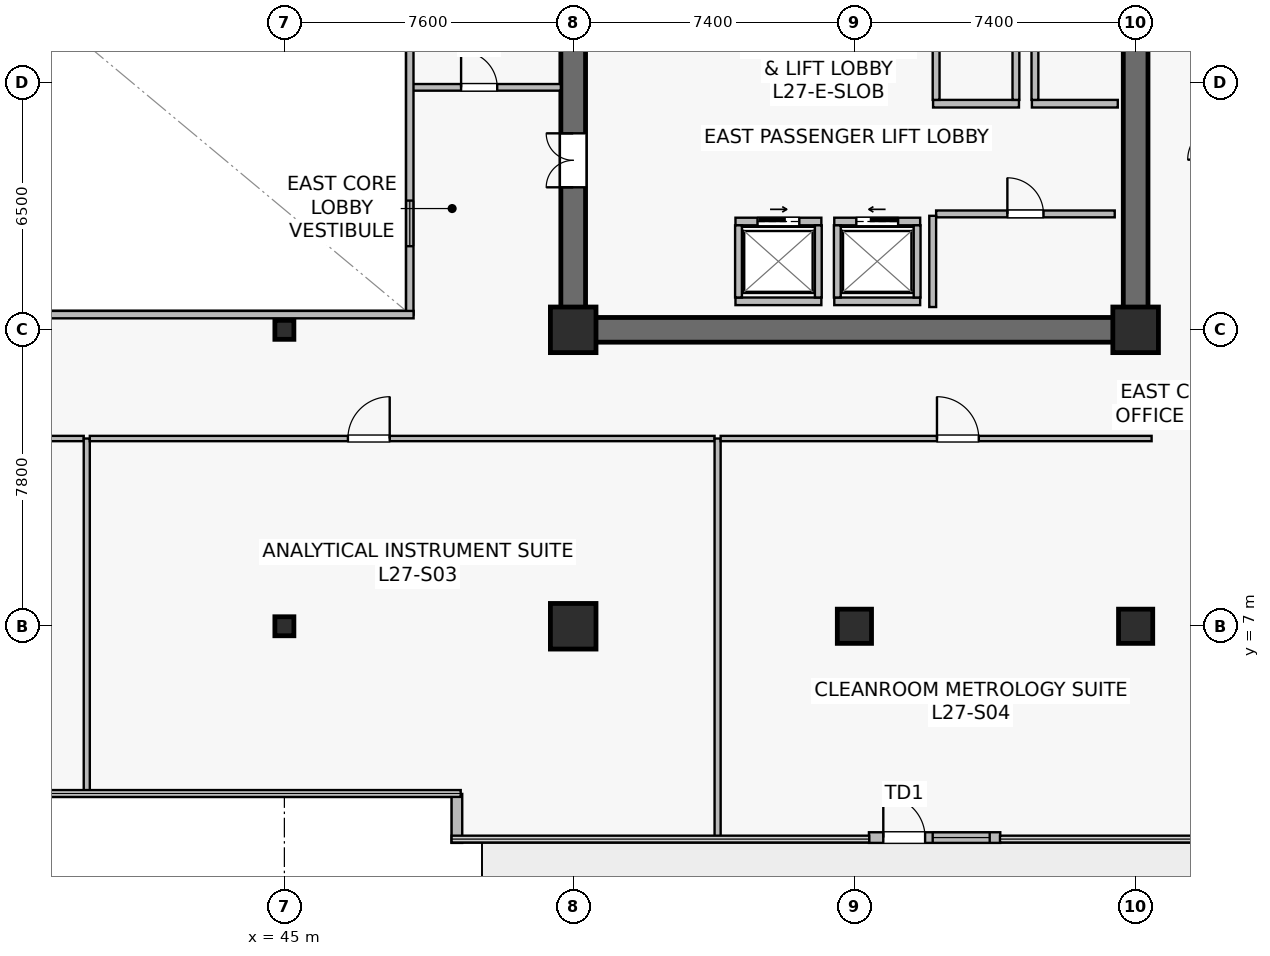
"""IFC4 building model, lengths in metres.
Left out: names, types, materials, properties, quantities, classifications, styles, units other than length and angle.
Written with IfcOpenShell. Run it as: python <this file> out.ifc"""

import sys

from ifc_helpers import new_model, si_unit, direction, frame, frame_2d, origin, origin_2d, place, context, subcontext, project, spatial, rectangle, hollow_rectangle, extrude, source, transform, mapped, element, fill, save


model = new_model("IFC4")
c1 = context("Model", 3, precision=1e-05, world=origin(), true_north=direction((0.0, 1.0)))
c2 = subcontext(c1, "Body", "Model", "MODEL_VIEW")
j1 = project(units=[si_unit("LENGTHUNIT", "METRE"), si_unit("PLANEANGLEUNIT", "RADIAN")], contexts=[c1])
p1 = place(None, origin())
s1 = spatial("IfcSite", under=j1, at=p1, CompositionType="ELEMENT")
p2 = place(p1, origin())
s2 = spatial("IfcBuilding", under=s1, at=p2, CompositionType="ELEMENT")
p3 = place(p2, frame((0.0, 0.0, 113.3)))
s3 = spatial("IfcBuildingStorey", under=s2, at=p3, CompositionType="ELEMENT", Elevation=113.3)
p4 = place(p3, frame((52.275, 14.8, 0.0), z_axis=(0.0, 0.0, 1.0), x_axis=(1.0, 0.0, 0.0)))
e1 = element("IfcWall", 1, at=p4, inside=s3, PredefinedType="SHEAR", context=c2, shape_type="SweptSolid", body=[
    extrude(rectangle(XDim=15.45, YDim=0.65, at=frame_2d((7.725, 0.0))), origin(), (0.0, 0.0, 1.0), 3.79),
])
p5 = place(p3, frame((52.6, 15.125, 0.0), z_axis=(0.0, 0.0, 1.0), x_axis=(0.0, 1.0, 0.0)))
e2 = element("IfcWall", 2, at=p5, inside=s3, PredefinedType="SHEAR", context=c2, shape_type="SweptSolid", body=[
    extrude(rectangle(XDim=18.35, YDim=0.65, at=frame_2d((9.175, 0.0))), origin(), (0.0, 0.0, 1.0), 3.79),
])
p6 = place(p5, frame((3.425, 0.0, 0.0)))
e3 = element("IfcOpeningElement", 3, at=p6, cuts=e2, PredefinedType="OPENING", context=c2, shape_type="SweptSolid", body=[
    extrude(rectangle(XDim=1.42, YDim=2.2, at=frame_2d((0.71, 1.1))), frame((0.0, 0.335, 0.0), z_axis=(0.0, -1.0, 0.0), x_axis=(1.0, 0.0, 0.0)), (0.0, 0.0, 1.0), 0.67),
])
p7 = place(p3, frame((67.4, 15.125, 0.0), z_axis=(0.0, 0.0, 1.0), x_axis=(0.0, 1.0, 0.0)))
e4 = element("IfcWall", 4, at=p7, inside=s3, PredefinedType="SHEAR", context=c2, shape_type="SweptSolid", body=[
    extrude(rectangle(XDim=18.35, YDim=0.65, at=frame_2d((9.175, 0.0))), origin(), (0.0, 0.0, 1.0), 3.79),
])
m1 = source(origin(), c2, "Body", "SweptSolid", [
    extrude(rectangle(XDim=1.2, YDim=1.2, at=origin_2d()), origin(), (0.0, 0.0, 1.0), 4.1),
])
p8 = place(p3, frame((52.6, 7.0, 0.0), z_axis=(0.0, 0.0, 1.0), x_axis=(1.0, 0.0, 0.0)))
e5 = element("IfcColumn", 5, at=p8, inside=s3, PredefinedType="COLUMN", context=c2, shape_type="MappedRepresentation", body=[
    mapped(m1, transform((0.0, 0.0, 0.0), scale=1.0)),
])
m2 = source(origin(), c2, "Body", "SweptSolid", [
    extrude(rectangle(XDim=0.9, YDim=0.9, at=origin_2d()), origin(), (0.0, 0.0, 1.0), 4.1),
])
p9 = place(p3, frame((60.0, 7.0, 0.0), z_axis=(0.0, 0.0, 1.0), x_axis=(1.0, 0.0, 0.0)))
e6 = element("IfcColumn", 6, at=p9, inside=s3, PredefinedType="COLUMN", context=c2, shape_type="MappedRepresentation", body=[
    mapped(m2, transform((0.0, 0.0, 0.0), scale=1.0)),
])
for number, where, z_axis, x_axis in (
    (7, (52.6, 14.8, 0.0), (0.0, 0.0, 1.0), (1.0, 0.0, 0.0)),
    (8, (67.4, 14.8, 0.0), (0.0, 0.0, 1.0), (1.0, 0.0, 0.0)),
):
    element("IfcColumn", number, at=place(p3, frame(where, z_axis=z_axis, x_axis=x_axis)), inside=s3, PredefinedType="COLUMN", context=c2, shape_type="MappedRepresentation", body=[
        mapped(m1, transform((0.0, 0.0, 0.0), scale=1.0)),
    ])
p10 = place(p3, frame((67.4, 7.0, 0.0), z_axis=(0.0, 0.0, 1.0), x_axis=(1.0, 0.0, 0.0)))
e9 = element("IfcColumn", 9, at=p10, inside=s3, PredefinedType="COLUMN", context=c2, shape_type="MappedRepresentation", body=[
    mapped(m2, transform((0.0, 0.0, 0.0), scale=1.0)),
])
m3 = source(origin(), c2, "Body", "SweptSolid", [
    extrude(hollow_rectangle(XDim=0.5, YDim=0.5, WallThickness=0.022, at=origin_2d()), origin(), (0.0, 0.0, 1.0), 4.1),
])
for number, where, z_axis, x_axis in (
    (10, (45.0, 7.0, 0.0), (0.0, 0.0, 1.0), (1.0, 0.0, 0.0)),
    (11, (45.0, 14.8, 0.0), (0.0, 0.0, 1.0), (1.0, 0.0, 0.0)),
):
    element("IfcColumn", number, at=place(p3, frame(where, z_axis=z_axis, x_axis=x_axis)), inside=s3, PredefinedType="COLUMN", context=c2, shape_type="MappedRepresentation", body=[
        mapped(m3, transform((0.0, 0.0, 0.0), scale=1.0)),
    ])
p11 = place(p3, frame((60.382, 1.44, 0.0), z_axis=(0.0, 0.0, 1.0), x_axis=(1.0, 0.0, 0.0)))
e12 = element("IfcWall", 12, at=p11, inside=s3, PredefinedType="STANDARD", context=c2, shape_type="SweptSolid", body=[
    extrude(rectangle(XDim=3.456, YDim=0.28, at=frame_2d((1.728, 0.0))), origin(), (0.0, 0.0, 1.0), 3.79),
])
p12 = place(p11, frame((0.378, 0.0, 0.0)))
e13 = element("IfcOpeningElement", 13, at=p12, cuts=e12, PredefinedType="OPENING", context=c2, shape_type="SweptSolid", body=[
    extrude(rectangle(XDim=1.1, YDim=2.2, at=frame_2d((0.55, 1.1))), frame((0.0, 0.15, 0.0), z_axis=(0.0, -1.0, 0.0), x_axis=(1.0, 0.0, 0.0)), (0.0, 0.0, 1.0), 0.3),
])
p13 = place(p11, frame((1.678, 0.0, 0.9)))
e14 = element("IfcOpeningElement", 14, at=p13, cuts=e12, PredefinedType="OPENING", context=c2, shape_type="SweptSolid", body=[
    extrude(rectangle(XDim=1.5, YDim=2.2, at=frame_2d((0.75, 1.1))), frame((0.0, 0.15, 0.0), z_axis=(0.0, -1.0, 0.0), x_axis=(1.0, 0.0, 0.0)), (0.0, 0.0, 1.0), 0.3),
])
p14 = place(p3, frame((49.54, 2.588, 0.0), z_axis=(0.0, 0.0, 1.0), x_axis=(0.0, -1.0, 0.0)))
e15 = element("IfcWall", 15, at=p14, inside=s3, PredefinedType="STANDARD", context=c2, shape_type="SweptSolid", body=[
    extrude(rectangle(XDim=1.288, YDim=0.28, at=frame_2d((0.644, 0.0))), origin(), (0.0, 0.0, 1.0), 3.79),
])
p15 = place(p3, frame((59.47, 17.65, 0.0), z_axis=(0.0, 0.0, 1.0), x_axis=(1.0, 0.0, 0.0)))
e16 = element("IfcWall", 16, at=p15, inside=s3, PredefinedType="SOLIDWALL", context=c2, shape_type="SweptSolid", body=[
    extrude(rectangle(XDim=2.26, YDim=0.2, at=frame_2d((1.13, 0.0))), origin(), (0.0, 0.0, 1.0), 3.125),
])
p16 = place(p15, frame((0.58, 0.0, 0.0)))
e17 = element("IfcOpeningElement", 17, at=p16, cuts=e16, PredefinedType="OPENING", context=c2, shape_type="SweptSolid", body=[
    extrude(rectangle(XDim=1.1, YDim=2.22, at=frame_2d((0.55, 1.11))), frame((0.0, 0.11, 0.0), z_axis=(0.0, -1.0, 0.0), x_axis=(1.0, 0.0, 0.0)), (0.0, 0.0, 1.0), 0.22),
])
p17 = place(p3, frame((59.47, 15.55, 0.0), z_axis=(0.0, 0.0, 1.0), x_axis=(1.0, 0.0, 0.0)))
e18 = element("IfcWall", 18, at=p17, inside=s3, PredefinedType="SOLIDWALL", context=c2, shape_type="SweptSolid", body=[
    extrude(rectangle(XDim=2.26, YDim=0.2, at=frame_2d((1.13, 0.0))), origin(), (0.0, 0.0, 1.0), 3.125),
])
for number, where, z_axis, x_axis in (
    (19, (59.55, 15.65, 0.0), (0.0, 0.0, 1.0), (0.0, 1.0, 0.0)),
    (20, (61.65, 15.65, 0.0), (0.0, 0.0, 1.0), (0.0, 1.0, 0.0)),
):
    element("IfcWall", number, at=place(p3, frame(where, z_axis=z_axis, x_axis=x_axis)), inside=s3, PredefinedType="SOLIDWALL", context=c2, shape_type="SweptSolid", body=[
        extrude(rectangle(XDim=1.9, YDim=0.18, at=frame_2d((0.95, 0.0))), origin(), (0.0, 0.0, 1.0), 3.79),
    ])
p18 = place(p3, frame((56.87, 17.65, 0.0), z_axis=(0.0, 0.0, 1.0), x_axis=(1.0, 0.0, 0.0)))
e21 = element("IfcWall", 21, at=p18, inside=s3, PredefinedType="SOLIDWALL", context=c2, shape_type="SweptSolid", body=[
    extrude(rectangle(XDim=2.26, YDim=0.2, at=frame_2d((1.13, 0.0))), origin(), (0.0, 0.0, 1.0), 3.79),
])
p19 = place(p18, frame((0.58, 0.0, 0.0)))
e22 = element("IfcOpeningElement", 22, at=p19, cuts=e21, PredefinedType="OPENING", context=c2, shape_type="SweptSolid", body=[
    extrude(rectangle(XDim=1.1, YDim=2.22, at=frame_2d((0.55, 1.11))), frame((0.0, 0.11, 0.0), z_axis=(0.0, -1.0, 0.0), x_axis=(1.0, 0.0, 0.0)), (0.0, 0.0, 1.0), 0.22),
])
p20 = place(p3, frame((56.87, 15.55, 0.0), z_axis=(0.0, 0.0, 1.0), x_axis=(1.0, 0.0, 0.0)))
e23 = element("IfcWall", 23, at=p20, inside=s3, PredefinedType="SOLIDWALL", context=c2, shape_type="SweptSolid", body=[
    extrude(rectangle(XDim=2.26, YDim=0.2, at=frame_2d((1.13, 0.0))), origin(), (0.0, 0.0, 1.0), 3.79),
])
for number, where, z_axis, x_axis in (
    (24, (56.95, 15.65, 0.0), (0.0, 0.0, 1.0), (0.0, 1.0, 0.0)),
    (25, (59.05, 15.65, 0.0), (0.0, 0.0, 1.0), (0.0, 1.0, 0.0)),
):
    element("IfcWall", number, at=place(p3, frame(where, z_axis=z_axis, x_axis=x_axis)), inside=s3, PredefinedType="SOLIDWALL", context=c2, shape_type="SweptSolid", body=[
        extrude(rectangle(XDim=1.9, YDim=0.18, at=frame_2d((0.95, 0.0))), origin(), (0.0, 0.0, 1.0), 3.79),
    ])
p21 = place(p3, frame((64.67, 20.75, 0.0), z_axis=(0.0, 0.0, 1.0), x_axis=(1.0, 0.0, 0.0)))
e26 = element("IfcWall", 26, at=p21, inside=s3, PredefinedType="SOLIDWALL", context=c2, shape_type="SweptSolid", body=[
    extrude(rectangle(XDim=2.26, YDim=0.2, at=frame_2d((1.13, 0.0))), origin(), (0.0, 0.0, 1.0), 3.79),
])
p22 = place(p3, frame((64.75, 20.85, 0.0), z_axis=(0.0, 0.0, 1.0), x_axis=(0.0, 1.0, 0.0)))
e27 = element("IfcWall", 27, at=p22, inside=s3, PredefinedType="SOLIDWALL", context=c2, shape_type="SweptSolid", body=[
    extrude(rectangle(XDim=1.9, YDim=0.18, at=frame_2d((0.95, 0.0))), origin(), (0.0, 0.0, 1.0), 3.79),
])
p23 = place(p3, frame((62.07, 20.75, 0.0), z_axis=(0.0, 0.0, 1.0), x_axis=(1.0, 0.0, 0.0)))
e28 = element("IfcWall", 28, at=p23, inside=s3, PredefinedType="SOLIDWALL", context=c2, shape_type="SweptSolid", body=[
    extrude(rectangle(XDim=2.26, YDim=0.2, at=frame_2d((1.13, 0.0))), origin(), (0.0, 0.0, 1.0), 3.79),
])
for number, where, z_axis, x_axis in (
    (29, (62.15, 20.85, 0.0), (0.0, 0.0, 1.0), (0.0, 1.0, 0.0)),
    (30, (64.25, 20.85, 0.0), (0.0, 0.0, 1.0), (0.0, 1.0, 0.0)),
):
    element("IfcWall", number, at=place(p3, frame(where, z_axis=z_axis, x_axis=x_axis)), inside=s3, PredefinedType="SOLIDWALL", context=c2, shape_type="SweptSolid", body=[
        extrude(rectangle(XDim=1.9, YDim=0.18, at=frame_2d((0.95, 0.0))), origin(), (0.0, 0.0, 1.0), 3.79),
    ])
p24 = place(p3, frame((62.15, 17.85, 0.0), z_axis=(0.0, 0.0, 1.0), x_axis=(1.0, 0.0, 0.0)))
e31 = element("IfcWall", 31, at=p24, inside=s3, PredefinedType="SOLIDWALL", context=c2, shape_type="SweptSolid", body=[
    extrude(rectangle(XDim=4.7, YDim=0.18, at=frame_2d((2.35, 0.0))), origin(), (0.0, 0.0, 1.0), 3.79),
])
p25 = place(p24, frame((1.875, 0.0, 0.0)))
e32 = element("IfcOpeningElement", 32, at=p25, cuts=e31, PredefinedType="OPENING", context=c2, shape_type="SweptSolid", body=[
    extrude(rectangle(XDim=0.95, YDim=2.15, at=frame_2d((0.475, 1.075))), frame((0.0, 0.1, 0.0), z_axis=(0.0, -1.0, 0.0), x_axis=(1.0, 0.0, 0.0)), (0.0, 0.0, 1.0), 0.2),
])
p26 = place(p3, frame((62.06, 15.4, 0.0), z_axis=(0.0, 0.0, 1.0), x_axis=(0.0, 1.0, 0.0)))
e33 = element("IfcWall", 33, at=p26, inside=s3, PredefinedType="SOLIDWALL", context=c2, shape_type="SweptSolid", body=[
    extrude(rectangle(XDim=2.4, YDim=0.18, at=frame_2d((1.2, 0.0))), origin(), (0.0, 0.0, 1.0), 3.79),
])
p27 = place(p3, frame((48.3, 21.18, 0.0), z_axis=(0.0, 0.0, 1.0), x_axis=(1.0, 0.0, 0.0)))
e34 = element("IfcWall", 34, at=p27, inside=s3, PredefinedType="PARTITIONING", context=c2, shape_type="SweptSolid", body=[
    extrude(rectangle(XDim=3.975, YDim=0.175, at=frame_2d((1.987, 0.0))), origin(), (0.0, 0.0, 1.0), 3.79),
])
p28 = place(p27, frame((1.35, 0.0, 0.0)))
e35 = element("IfcOpeningElement", 35, at=p28, cuts=e34, PredefinedType="OPENING", context=c2, shape_type="SweptSolid", body=[
    extrude(rectangle(XDim=0.95, YDim=2.15, at=frame_2d((0.475, 1.075))), frame((0.0, 0.098, 0.0), z_axis=(0.0, -1.0, 0.0), x_axis=(1.0, 0.0, 0.0)), (0.0, 0.0, 1.0), 0.195),
])
p29 = place(p3, frame((48.3, 15.2, 0.0), z_axis=(0.0, 0.0, 1.0), x_axis=(0.0, 1.0, 0.0)))
e36 = element("IfcWall", 36, at=p29, inside=s3, PredefinedType="SOLIDWALL", context=c2, shape_type="SweptSolid", body=[
    extrude(rectangle(XDim=18.2, YDim=0.195, at=frame_2d((9.1, 0.0))), origin(), (0.0, 0.0, 1.0), 3.79),
])
p30 = place(p29, frame((1.8, 0.0, 0.9)))
e37 = element("IfcOpeningElement", 37, at=p30, cuts=e36, PredefinedType="OPENING", context=c2, shape_type="SweptSolid", body=[
    extrude(rectangle(XDim=1.2, YDim=1.35, at=frame_2d((0.6, 0.675))), frame((0.0, 0.107, 0.0), z_axis=(0.0, -1.0, 0.0), x_axis=(1.0, 0.0, 0.0)), (0.0, 0.0, 1.0), 0.215),
])
p31 = place(p29, frame((13.2, 0.0, 0.9)))
e38 = element("IfcOpeningElement", 38, at=p31, cuts=e36, PredefinedType="OPENING", context=c2, shape_type="SweptSolid", body=[
    extrude(rectangle(XDim=1.2, YDim=1.35, at=frame_2d((0.6, 0.675))), frame((0.0, 0.107, 0.0), z_axis=(0.0, -1.0, 0.0), x_axis=(1.0, 0.0, 0.0)), (0.0, 0.0, 1.0), 0.215),
])
p32 = place(p3, frame((26.4, 15.2, 0.0), z_axis=(0.0, 0.0, 1.0), x_axis=(1.0, 0.0, 0.0)))
e39 = element("IfcWall", 39, at=p32, inside=s3, PredefinedType="SOLIDWALL", context=c2, shape_type="SweptSolid", body=[
    extrude(rectangle(XDim=22.0, YDim=0.195, at=frame_2d((11.0, 0.0))), origin(), (0.0, 0.0, 1.0), 3.79),
])
p33 = place(p3, frame((20.68, 11.94, 0.0), z_axis=(0.0, 0.0, 1.0), x_axis=(1.0, 0.0, 0.0)))
e40 = element("IfcWall", 40, at=p33, inside=s3, PredefinedType="PARTITIONING", context=c2, shape_type="SweptSolid", body=[
    extrude(rectangle(XDim=19.04, YDim=0.14, at=frame_2d((9.52, 0.0))), origin(), (0.0, 0.0, 1.0), 3.125),
])
p34 = place(p33, frame((10.004, 0.0, 0.0)))
e41 = element("IfcOpeningElement", 41, at=p34, cuts=e40, PredefinedType="OPENING", context=c2, shape_type="SweptSolid", body=[
    extrude(rectangle(XDim=1.1, YDim=2.18, at=frame_2d((0.55, 1.09))), frame((0.0, 0.08, 0.0), z_axis=(0.0, -1.0, 0.0), x_axis=(1.0, 0.0, 0.0)), (0.0, 0.0, 1.0), 0.16),
])
p35 = place(p3, frame((39.8, 2.61, 0.0), z_axis=(0.0, 0.0, 1.0), x_axis=(0.0, 1.0, 0.0)))
e42 = element("IfcWall", 42, at=p35, inside=s3, PredefinedType="PARTITIONING", context=c2, shape_type="SweptSolid", body=[
    extrude(rectangle(XDim=9.33, YDim=0.16, at=frame_2d((4.665, 0.0))), origin(), (0.0, 0.0, 1.0), 3.075),
])
p36 = place(p3, frame((39.88, 11.94, 0.0), z_axis=(0.0, 0.0, 1.0), x_axis=(1.0, 0.0, 0.0)))
e43 = element("IfcWall", 43, at=p36, inside=s3, PredefinedType="PARTITIONING", context=c2, shape_type="SweptSolid", body=[
    extrude(rectangle(XDim=16.44, YDim=0.14, at=frame_2d((8.22, 0.0))), origin(), (0.0, 0.0, 1.0), 3.125),
])
p37 = place(p36, frame((6.792, 0.0, 0.0)))
e44 = element("IfcOpeningElement", 44, at=p37, cuts=e43, PredefinedType="OPENING", context=c2, shape_type="SweptSolid", body=[
    extrude(rectangle(XDim=1.1, YDim=2.18, at=frame_2d((0.55, 1.09))), frame((0.0, 0.08, 0.0), z_axis=(0.0, -1.0, 0.0), x_axis=(1.0, 0.0, 0.0)), (0.0, 0.0, 1.0), 0.16),
])
p38 = place(p3, frame((56.4, 1.41, 0.0), z_axis=(0.0, 0.0, 1.0), x_axis=(0.0, 1.0, 0.0)))
e45 = element("IfcWall", 45, at=p38, inside=s3, PredefinedType="PARTITIONING", context=c2, shape_type="SweptSolid", body=[
    extrude(rectangle(XDim=10.53, YDim=0.16, at=frame_2d((5.265, 0.0))), origin(), (0.0, 0.0, 1.0), 3.075),
])
p39 = place(p3, frame((56.48, 11.94, 0.0), z_axis=(0.0, 0.0, 1.0), x_axis=(1.0, 0.0, 0.0)))
e46 = element("IfcWall", 46, at=p39, inside=s3, PredefinedType="PARTITIONING", context=c2, shape_type="SweptSolid", body=[
    extrude(rectangle(XDim=11.34, YDim=0.14, at=frame_2d((5.67, 0.0))), origin(), (0.0, 0.0, 1.0), 3.125),
])
p40 = place(p39, frame((5.692, 0.0, 0.0)))
e47 = element("IfcOpeningElement", 47, at=p40, cuts=e46, PredefinedType="OPENING", context=c2, shape_type="SweptSolid", body=[
    extrude(rectangle(XDim=1.1, YDim=2.18, at=frame_2d((0.55, 1.09))), frame((0.0, 0.08, 0.0), z_axis=(0.0, -1.0, 0.0), x_axis=(1.0, 0.0, 0.0)), (0.0, 0.0, 1.0), 0.16),
])
m4 = source(origin(), c2, "Body", "SweptSolid", [
    extrude(rectangle(XDim=1.1, YDim=2.2, at=frame_2d((0.55, 1.1))), frame((0.0, 0.025, 0.0), z_axis=(0.0, -1.0, 0.0), x_axis=(1.0, 0.0, 0.0)), (0.0, 0.0, 1.0), 0.05),
])
p41 = place(p12, origin())
e48 = element("IfcDoor", 48, at=p41, inside=s3, OperationType="SINGLE_SWING_LEFT", PredefinedType="DOOR", context=c2, shape_type="MappedRepresentation", body=[
    mapped(m4, transform((0.0, 0.0, 0.0), scale=1.0)),
])
fill(e13, e48)
m5 = source(origin(), c2, "Body", "SweptSolid", [
    extrude(rectangle(XDim=1.5, YDim=2.2, at=frame_2d((0.75, 1.1))), frame((0.0, 0.03, 0.0), z_axis=(0.0, -1.0, 0.0), x_axis=(1.0, 0.0, 0.0)), (0.0, 0.0, 1.0), 0.06),
])
p42 = place(p13, origin())
e49 = element("IfcWindow", 49, at=p42, inside=s3, PartitioningType="SINGLE_PANEL", PredefinedType="WINDOW", context=c2, shape_type="MappedRepresentation", body=[
    mapped(m5, transform((0.0, 0.0, 0.0), scale=1.0)),
])
fill(e14, e49)
m6 = source(origin(), c2, "Body", "SweptSolid", [
    extrude(rectangle(XDim=1.2, YDim=1.35, at=frame_2d((0.6, 0.675))), frame((0.0, 0.03, 0.0), z_axis=(0.0, -1.0, 0.0), x_axis=(1.0, 0.0, 0.0)), (0.0, 0.0, 1.0), 0.06),
])
p43 = place(p30, origin())
e50 = element("IfcWindow", 50, at=p43, inside=s3, PartitioningType="SINGLE_PANEL", PredefinedType="WINDOW", context=c2, shape_type="MappedRepresentation", body=[
    mapped(m6, transform((0.0, 0.0, 0.0), scale=1.0)),
])
fill(e37, e50)
m7 = source(origin(), c2, "Body", "SweptSolid", [
    extrude(rectangle(XDim=1.1, YDim=2.22, at=frame_2d((0.55, 1.11))), frame((0.0, 0.025, 0.0), z_axis=(0.0, -1.0, 0.0), x_axis=(1.0, 0.0, 0.0)), (0.0, 0.0, 1.0), 0.05),
])
p44 = place(p16, origin())
e51 = element("IfcDoor", 51, at=p44, inside=s3, OperationType="SLIDING_TO_LEFT", PredefinedType="USERDEFINED", context=c2, shape_type="MappedRepresentation", body=[
    mapped(m7, transform((0.0, 0.0, 0.0), scale=1.0)),
])
fill(e17, e51)
p45 = place(p19, origin())
e52 = element("IfcDoor", 52, at=p45, inside=s3, OperationType="SLIDING_TO_RIGHT", PredefinedType="USERDEFINED", context=c2, shape_type="MappedRepresentation", body=[
    mapped(m7, transform((0.0, 0.0, 0.0), scale=1.0)),
])
fill(e22, e52)
m8 = source(origin(), c2, "Body", "SweptSolid", [
    extrude(rectangle(XDim=0.95, YDim=2.15, at=frame_2d((0.475, 1.075))), frame((0.0, 0.025, 0.0), z_axis=(0.0, -1.0, 0.0), x_axis=(1.0, 0.0, 0.0)), (0.0, 0.0, 1.0), 0.05),
])
p46 = place(p25, origin())
e53 = element("IfcDoor", 53, at=p46, inside=s3, OperationType="SINGLE_SWING_LEFT", PredefinedType="DOOR", context=c2, shape_type="MappedRepresentation", body=[
    mapped(m8, transform((0.0, 0.0, 0.0), scale=1.0)),
])
fill(e32, e53)
m9 = source(origin(), c2, "Body", "SweptSolid", [
    extrude(rectangle(XDim=1.42, YDim=2.2, at=frame_2d((0.71, 1.1))), frame((0.0, 0.025, 0.0), z_axis=(0.0, -1.0, 0.0), x_axis=(1.0, 0.0, 0.0)), (0.0, 0.0, 1.0), 0.05),
])
p47 = place(p6, origin())
e54 = element("IfcDoor", 54, at=p47, inside=s3, OperationType="DOUBLE_DOOR_SINGLE_SWING", PredefinedType="DOOR", context=c2, shape_type="MappedRepresentation", body=[
    mapped(m9, transform((0.0, 0.0, 0.0), scale=1.0)),
])
fill(e3, e54)
p48 = place(p28, origin())
e55 = element("IfcDoor", 55, at=p48, inside=s3, OperationType="SINGLE_SWING_LEFT", PredefinedType="DOOR", context=c2, shape_type="MappedRepresentation", body=[
    mapped(m8, transform((0.0, 0.0, 0.0), scale=1.0)),
])
fill(e35, e55)
m10 = source(origin(), c2, "Body", "SweptSolid", [
    extrude(rectangle(XDim=1.1, YDim=2.18, at=frame_2d((0.55, 1.09))), frame((0.0, 0.025, 0.0), z_axis=(0.0, -1.0, 0.0), x_axis=(1.0, 0.0, 0.0)), (0.0, 0.0, 1.0), 0.05),
])
p49 = place(p37, origin())
e56 = element("IfcDoor", 56, at=p49, inside=s3, OperationType="SINGLE_SWING_RIGHT", PredefinedType="DOOR", context=c2, shape_type="MappedRepresentation", body=[
    mapped(m10, transform((0.0, 0.0, 0.0), scale=1.0)),
])
fill(e44, e56)
p50 = place(p40, origin())
e57 = element("IfcDoor", 57, at=p50, inside=s3, OperationType="SINGLE_SWING_LEFT", PredefinedType="DOOR", context=c2, shape_type="MappedRepresentation", body=[
    mapped(m10, transform((0.0, 0.0, 0.0), scale=1.0)),
])
fill(e47, e57)
save(model, sys.argv[1])
